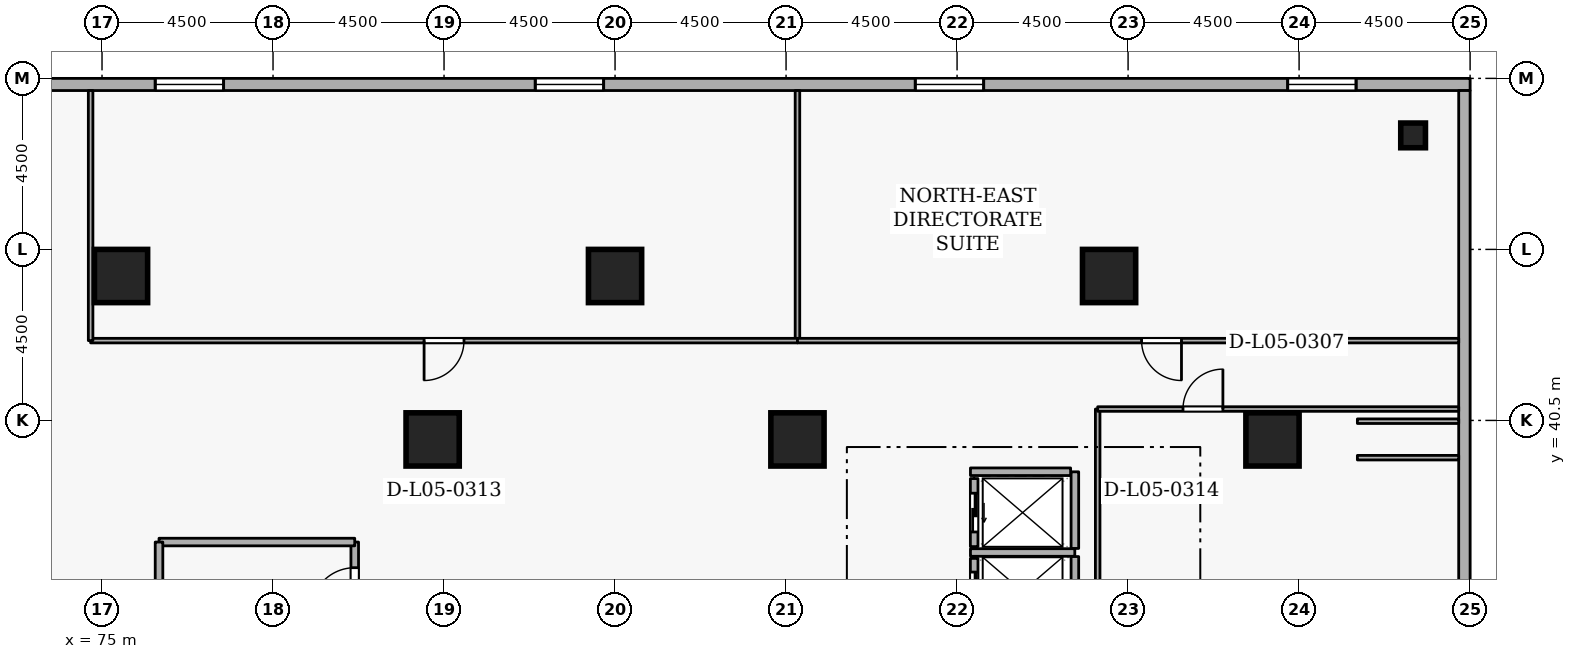
"""IFC4 building model, lengths in metres.
Left out: names, types, materials, properties, quantities, classifications, styles, units other than length and angle.
Written with IfcOpenShell. Run it as: python <this file> out.ifc"""

import sys

from ifc_helpers import new_model, si_unit, direction, frame, frame_2d, origin, origin_2d, place, context, subcontext, project, spatial, rectangle, extrude, element, fill, save


model = new_model("IFC4")
c1 = context("Model", 3, precision=1e-05, world=origin(), true_north=direction((0.0, 1.0)))
c2 = subcontext(c1, "Body", "Model", "MODEL_VIEW")
j1 = project(units=[si_unit("LENGTHUNIT", "METRE"), si_unit("PLANEANGLEUNIT", "RADIAN")], contexts=[c1])
p1 = place(None, origin())
s1 = spatial("IfcSite", under=j1, at=p1, CompositionType="ELEMENT")
p2 = place(p1, origin())
s2 = spatial("IfcBuilding", under=s1, at=p2, CompositionType="ELEMENT")
p3 = place(p2, frame((0.0, 0.0, 23.1)))
s3 = spatial("IfcBuildingStorey", under=s2, at=p3, CompositionType="ELEMENT", Elevation=23.1)
for number, where, z_axis, x_axis in (
    (1, (105.8, 40.0, 0.0), (0.0, 0.0, 1.0), (1.0, 0.0, 0.0)),
    (2, (101.5, 44.3, 0.0), (0.0, 0.0, 1.0), (1.0, 0.0, 0.0)),
    (3, (88.5, 44.3, 0.0), (0.0, 0.0, 1.0), (1.0, 0.0, 0.0)),
    (4, (75.5, 44.3, 0.0), (0.0, 0.0, 1.0), (1.0, 0.0, 0.0)),
    (5, (93.3, 40.0, 0.0), (0.0, 0.0, 1.0), (1.0, 0.0, 0.0)),
    (6, (83.7, 40.0, 0.0), (0.0, 0.0, 1.0), (1.0, 0.0, 0.0)),
):
    element("IfcColumn", number, at=place(p3, frame(where, z_axis=z_axis, x_axis=x_axis)), inside=s3, PredefinedType="COLUMN", context=c2, shape_type="SweptSolid", body=[
        extrude(rectangle(XDim=1.4, YDim=1.4, at=origin_2d()), origin(), (0.0, 0.0, 1.0), 4.8),
    ])
p4 = place(p3, frame((109.5, 48.0, 0.0), z_axis=(0.0, 0.0, 1.0), x_axis=(1.0, 0.0, 0.0)))
e7 = element("IfcColumn", 7, at=p4, inside=s3, PredefinedType="COLUMN", context=c2, shape_type="SweptSolid", body=[
    extrude(rectangle(XDim=0.65, YDim=0.65, at=origin_2d()), origin(), (0.0, 0.0, 1.0), 4.8),
])
p5 = place(p3, frame((111.0, 49.34, 0.0), z_axis=(0.0, 0.0, 1.0), x_axis=(-1.0, 0.0, 0.0)))
e8 = element("IfcWall", 8, at=p5, inside=s3, PredefinedType="STANDARD", context=c2, shape_type="SweptSolid", body=[
    extrude(rectangle(XDim=39.4, YDim=0.32, at=frame_2d((19.7, 0.0))), origin(), (0.0, 0.0, 1.0), 2.84),
])
p6 = place(p5, frame((3.0, 0.0, 0.65)))
e9 = element("IfcOpeningElement", 9, at=p6, cuts=e8, PredefinedType="OPENING", context=c2, shape_type="SweptSolid", body=[
    extrude(rectangle(XDim=1.8, YDim=1.25, at=frame_2d((0.9, 0.625))), frame((0.0, 0.17, 0.0), z_axis=(0.0, -1.0, 0.0), x_axis=(1.0, 0.0, 0.0)), (0.0, 0.0, 1.0), 0.34),
])
p7 = place(p5, frame((12.8, 0.0, 0.65)))
e10 = element("IfcOpeningElement", 10, at=p7, cuts=e8, PredefinedType="OPENING", context=c2, shape_type="SweptSolid", body=[
    extrude(rectangle(XDim=1.8, YDim=1.25, at=frame_2d((0.9, 0.625))), frame((0.0, 0.17, 0.0), z_axis=(0.0, -1.0, 0.0), x_axis=(1.0, 0.0, 0.0)), (0.0, 0.0, 1.0), 0.34),
])
p8 = place(p5, frame((22.8, 0.0, 0.65)))
e11 = element("IfcOpeningElement", 11, at=p8, cuts=e8, PredefinedType="OPENING", context=c2, shape_type="SweptSolid", body=[
    extrude(rectangle(XDim=1.8, YDim=1.25, at=frame_2d((0.9, 0.625))), frame((0.0, 0.17, 0.0), z_axis=(0.0, -1.0, 0.0), x_axis=(1.0, 0.0, 0.0)), (0.0, 0.0, 1.0), 0.34),
])
p9 = place(p5, frame((32.8, 0.0, 0.65)))
e12 = element("IfcOpeningElement", 12, at=p9, cuts=e8, PredefinedType="OPENING", context=c2, shape_type="SweptSolid", body=[
    extrude(rectangle(XDim=1.8, YDim=1.25, at=frame_2d((0.9, 0.625))), frame((0.0, 0.17, 0.0), z_axis=(0.0, -1.0, 0.0), x_axis=(1.0, 0.0, 0.0)), (0.0, 0.0, 1.0), 0.34),
])
p10 = place(p3, frame((110.85, 12.32, 0.0), z_axis=(0.0, 0.0, 1.0), x_axis=(0.0, 1.0, 0.0)))
e13 = element("IfcWall", 13, at=p10, inside=s3, PredefinedType="STANDARD", context=c2, shape_type="SweptSolid", body=[
    extrude(rectangle(XDim=36.86, YDim=0.3, at=frame_2d((18.43, 0.0))), origin(), (0.0, 0.0, 1.0), 2.84),
])
p11 = place(p3, frame((97.95, 36.87, 0.0), z_axis=(0.0, 0.0, 1.0), x_axis=(0.0, -1.0, 0.0)))
e14 = element("IfcWall", 14, at=p11, inside=s3, PredefinedType="STANDARD", context=c2, shape_type="SweptSolid", body=[
    extrude(rectangle(XDim=1.74, YDim=0.2, at=frame_2d((0.87, 0.0))), origin(), (0.0, 0.0, 1.0), 4.54),
])
p12 = place(p11, frame((0.36, 0.0, 0.0)))
e15 = element("IfcOpeningElement", 15, at=p12, cuts=e14, PredefinedType="OPENING", context=c2, shape_type="SweptSolid", body=[
    extrude(rectangle(XDim=1.02, YDim=2.06, at=frame_2d((0.51, 1.03))), frame((0.0, 0.11, 0.0), z_axis=(0.0, -1.0, 0.0), x_axis=(1.0, 0.0, 0.0)), (0.0, 0.0, 1.0), 0.22),
])
p13 = place(p3, frame((97.95, 38.97, 0.0), z_axis=(0.0, 0.0, 1.0), x_axis=(0.0, -1.0, 0.0)))
e16 = element("IfcWall", 16, at=p13, inside=s3, PredefinedType="STANDARD", context=c2, shape_type="SweptSolid", body=[
    extrude(rectangle(XDim=1.79, YDim=0.2, at=frame_2d((0.895, 0.0))), origin(), (0.0, 0.0, 1.0), 4.54),
])
p14 = place(p13, frame((0.385, 0.0, 0.0)))
e17 = element("IfcOpeningElement", 17, at=p14, cuts=e16, PredefinedType="OPENING", context=c2, shape_type="SweptSolid", body=[
    extrude(rectangle(XDim=1.02, YDim=2.06, at=frame_2d((0.51, 1.03))), frame((0.0, 0.11, 0.0), z_axis=(0.0, -1.0, 0.0), x_axis=(1.0, 0.0, 0.0)), (0.0, 0.0, 1.0), 0.22),
])
p15 = place(p3, frame((97.852, 37.025, 0.0), z_axis=(0.0, 0.0, 1.0), x_axis=(1.0, 0.0, 0.0)))
e18 = element("IfcWall", 18, at=p15, inside=s3, PredefinedType="STANDARD", context=c2, shape_type="SweptSolid", body=[
    extrude(rectangle(XDim=2.746, YDim=0.2, at=frame_2d((1.373, 0.0))), origin(), (0.0, 0.0, 1.0), 4.54),
])
p16 = place(p3, frame((100.6, 35.062, 0.0), z_axis=(0.0, 0.0, 1.0), x_axis=(0.0, 1.0, 0.0)))
e19 = element("IfcWall", 19, at=p16, inside=s3, PredefinedType="STANDARD", context=c2, shape_type="SweptSolid", body=[
    extrude(rectangle(XDim=1.856, YDim=0.2, at=frame_2d((0.928, 0.0))), origin(), (0.0, 0.0, 1.0), 4.54),
])
p17 = place(p3, frame((100.6, 37.132, 0.0), z_axis=(0.0, 0.0, 1.0), x_axis=(0.0, 1.0, 0.0)))
e20 = element("IfcWall", 20, at=p17, inside=s3, PredefinedType="STANDARD", context=c2, shape_type="SweptSolid", body=[
    extrude(rectangle(XDim=2.016, YDim=0.2, at=frame_2d((1.008, 0.0))), origin(), (0.0, 0.0, 1.0), 4.54),
])
p18 = place(p3, frame((97.852, 39.15, 0.0), z_axis=(0.0, 0.0, 1.0), x_axis=(1.0, 0.0, 0.0)))
e21 = element("IfcWall", 21, at=p18, inside=s3, PredefinedType="STANDARD", context=c2, shape_type="SweptSolid", body=[
    extrude(rectangle(XDim=2.636, YDim=0.2, at=frame_2d((1.318, 0.0))), origin(), (0.0, 0.0, 1.0), 4.54),
])
p19 = place(p3, frame((81.65, 34.8, 0.0), z_axis=(0.0, 0.0, 1.0), x_axis=(0.0, 1.0, 0.0)))
e22 = element("IfcWall", 22, at=p19, inside=s3, PredefinedType="STANDARD", context=c2, shape_type="SweptSolid", body=[
    extrude(rectangle(XDim=2.5, YDim=0.2, at=frame_2d((1.25, 0.0))), origin(), (0.0, 0.0, 1.0), 4.54),
])
p20 = place(p19, frame((0.675, 0.0, 0.0)))
e23 = element("IfcOpeningElement", 23, at=p20, cuts=e22, PredefinedType="OPENING", context=c2, shape_type="SweptSolid", body=[
    extrude(rectangle(XDim=1.15, YDim=2.1, at=frame_2d((0.575, 1.05))), frame((0.0, 0.11, 0.0), z_axis=(0.0, -1.0, 0.0), x_axis=(1.0, 0.0, 0.0)), (0.0, 0.0, 1.0), 0.22),
])
p21 = place(p3, frame((81.65, 37.3, 0.0), z_axis=(0.0, 0.0, 1.0), x_axis=(-1.0, 0.0, 0.0)))
e24 = element("IfcWall", 24, at=p21, inside=s3, PredefinedType="STANDARD", context=c2, shape_type="SweptSolid", body=[
    extrude(rectangle(XDim=5.15, YDim=0.2, at=frame_2d((2.575, 0.0))), origin(), (0.0, 0.0, 1.0), 4.54),
])
p22 = place(p3, frame((76.5, 37.3, 0.0), z_axis=(0.0, 0.0, 1.0), x_axis=(0.0, -1.0, 0.0)))
e25 = element("IfcWall", 25, at=p22, inside=s3, PredefinedType="STANDARD", context=c2, shape_type="SweptSolid", body=[
    extrude(rectangle(XDim=2.5, YDim=0.2, at=frame_2d((1.25, 0.0))), origin(), (0.0, 0.0, 1.0), 4.54),
])
p23 = place(p3, frame((101.2, 27.0, 0.0), z_axis=(0.0, 0.0, 1.0), x_axis=(0.0, 1.0, 0.0)))
e26 = element("IfcWall", 26, at=p23, inside=s3, PredefinedType="PARTITIONING", context=c2, shape_type="SweptSolid", body=[
    extrude(rectangle(XDim=13.8, YDim=0.12, at=frame_2d((6.9, 0.0))), origin(), (0.0, 0.0, 1.0), 4.54),
])
p24 = place(p3, frame((101.2, 40.8, 0.0), z_axis=(0.0, 0.0, 1.0), x_axis=(1.0, 0.0, 0.0)))
e27 = element("IfcWall", 27, at=p24, inside=s3, PredefinedType="PARTITIONING", context=c2, shape_type="SweptSolid", body=[
    extrude(rectangle(XDim=9.5, YDim=0.12, at=frame_2d((4.75, 0.0))), origin(), (0.0, 0.0, 1.0), 4.54),
])
p25 = place(p24, frame((2.245, 0.0, 0.0)))
e28 = element("IfcOpeningElement", 28, at=p25, cuts=e27, PredefinedType="OPENING", context=c2, shape_type="SweptSolid", body=[
    extrude(rectangle(XDim=1.05, YDim=2.1, at=frame_2d((0.525, 1.05))), frame((0.0, 0.07, 0.0), z_axis=(0.0, -1.0, 0.0), x_axis=(1.0, 0.0, 0.0)), (0.0, 0.0, 1.0), 0.14),
])
for number, where, z_axis, x_axis in (
    (29, (110.7, 40.48, 0.0), (0.0, 0.0, 1.0), (-1.0, 0.0, 0.0)),
    (30, (108.034, 39.52, 0.0), (0.0, 0.0, 1.0), (1.0, 0.0, 0.0)),
):
    element("IfcWall", number, at=place(p3, frame(where, z_axis=z_axis, x_axis=x_axis)), inside=s3, PredefinedType="PARTITIONING", context=c2, shape_type="SweptSolid", body=[
        extrude(rectangle(XDim=2.666, YDim=0.12, at=frame_2d((1.333, 0.0))), origin(), (0.0, 0.0, 1.0), 2.885),
    ])
p26 = place(p3, frame((93.3, 49.18, 0.0), z_axis=(0.0, 0.0, 1.0), x_axis=(0.0, -1.0, 0.0)))
e31 = element("IfcWall", 31, at=p26, inside=s3, PredefinedType="PARTITIONING", context=c2, shape_type="SweptSolid", body=[
    extrude(rectangle(XDim=6.58, YDim=0.12, at=frame_2d((3.29, 0.0))), origin(), (0.0, 0.0, 1.0), 4.54),
])
p27 = place(p3, frame((93.3, 42.6, 0.0), z_axis=(0.0, 0.0, 1.0), x_axis=(-1.0, 0.0, 0.0)))
e32 = element("IfcWall", 32, at=p27, inside=s3, PredefinedType="PARTITIONING", context=c2, shape_type="SweptSolid", body=[
    extrude(rectangle(XDim=18.6, YDim=0.12, at=frame_2d((9.3, 0.0))), origin(), (0.0, 0.0, 1.0), 4.54),
])
p28 = place(p27, frame((8.775, 0.0, 0.0)))
e33 = element("IfcOpeningElement", 33, at=p28, cuts=e32, PredefinedType="OPENING", context=c2, shape_type="SweptSolid", body=[
    extrude(rectangle(XDim=1.05, YDim=2.1, at=frame_2d((0.525, 1.05))), frame((0.0, 0.07, 0.0), z_axis=(0.0, -1.0, 0.0), x_axis=(1.0, 0.0, 0.0)), (0.0, 0.0, 1.0), 0.14),
])
p29 = place(p3, frame((74.7, 42.6, 0.0), z_axis=(0.0, 0.0, 1.0), x_axis=(0.0, 1.0, 0.0)))
e34 = element("IfcWall", 34, at=p29, inside=s3, PredefinedType="PARTITIONING", context=c2, shape_type="SweptSolid", body=[
    extrude(rectangle(XDim=6.58, YDim=0.12, at=frame_2d((3.29, 0.0))), origin(), (0.0, 0.0, 1.0), 4.54),
])
p30 = place(p3, frame((110.7, 42.6, 0.0), z_axis=(0.0, 0.0, 1.0), x_axis=(-1.0, 0.0, 0.0)))
e35 = element("IfcWall", 35, at=p30, inside=s3, PredefinedType="PARTITIONING", context=c2, shape_type="SweptSolid", body=[
    extrude(rectangle(XDim=17.4, YDim=0.12, at=frame_2d((8.7, 0.0))), origin(), (0.0, 0.0, 1.0), 4.54),
])
p31 = place(p30, frame((7.295, 0.0, 0.0)))
e36 = element("IfcOpeningElement", 36, at=p31, cuts=e35, PredefinedType="OPENING", context=c2, shape_type="SweptSolid", body=[
    extrude(rectangle(XDim=1.05, YDim=2.1, at=frame_2d((0.525, 1.05))), frame((0.0, 0.07, 0.0), z_axis=(0.0, -1.0, 0.0), x_axis=(1.0, 0.0, 0.0)), (0.0, 0.0, 1.0), 0.14),
])
p32 = place(p6, origin())
e37 = element("IfcWindow", 37, at=p32, inside=s3, PartitioningType="SINGLE_PANEL", PredefinedType="WINDOW", context=c2, shape_type="SweptSolid", body=[
    extrude(rectangle(XDim=1.8, YDim=1.25, at=frame_2d((0.9, 0.625))), frame((0.0, 0.03, 0.0), z_axis=(0.0, -1.0, 0.0), x_axis=(1.0, 0.0, 0.0)), (0.0, 0.0, 1.0), 0.06),
])
fill(e9, e37)
p33 = place(p7, origin())
e38 = element("IfcWindow", 38, at=p33, inside=s3, PartitioningType="SINGLE_PANEL", PredefinedType="WINDOW", context=c2, shape_type="SweptSolid", body=[
    extrude(rectangle(XDim=1.8, YDim=1.25, at=frame_2d((0.9, 0.625))), frame((0.0, 0.03, 0.0), z_axis=(0.0, -1.0, 0.0), x_axis=(1.0, 0.0, 0.0)), (0.0, 0.0, 1.0), 0.06),
])
fill(e10, e38)
p34 = place(p8, origin())
e39 = element("IfcWindow", 39, at=p34, inside=s3, PartitioningType="SINGLE_PANEL", PredefinedType="WINDOW", context=c2, shape_type="SweptSolid", body=[
    extrude(rectangle(XDim=1.8, YDim=1.25, at=frame_2d((0.9, 0.625))), frame((0.0, 0.03, 0.0), z_axis=(0.0, -1.0, 0.0), x_axis=(1.0, 0.0, 0.0)), (0.0, 0.0, 1.0), 0.06),
])
fill(e11, e39)
p35 = place(p9, origin())
e40 = element("IfcWindow", 40, at=p35, inside=s3, PartitioningType="SINGLE_PANEL", PredefinedType="WINDOW", context=c2, shape_type="SweptSolid", body=[
    extrude(rectangle(XDim=1.8, YDim=1.25, at=frame_2d((0.9, 0.625))), frame((0.0, 0.03, 0.0), z_axis=(0.0, -1.0, 0.0), x_axis=(1.0, 0.0, 0.0)), (0.0, 0.0, 1.0), 0.06),
])
fill(e12, e40)
p36 = place(p12, origin())
e41 = element("IfcDoor", 41, at=p36, inside=s3, OperationType="SLIDING_TO_LEFT", PredefinedType="DOOR", context=c2, shape_type="SweptSolid", body=[
    extrude(rectangle(XDim=1.02, YDim=2.06, at=frame_2d((0.51, 1.03))), frame((0.0, 0.025, 0.0), z_axis=(0.0, -1.0, 0.0), x_axis=(1.0, 0.0, 0.0)), (0.0, 0.0, 1.0), 0.05),
])
fill(e15, e41)
p37 = place(p14, origin())
e42 = element("IfcDoor", 42, at=p37, inside=s3, OperationType="SLIDING_TO_LEFT", PredefinedType="DOOR", context=c2, shape_type="SweptSolid", body=[
    extrude(rectangle(XDim=1.02, YDim=2.06, at=frame_2d((0.51, 1.03))), frame((0.0, 0.025, 0.0), z_axis=(0.0, -1.0, 0.0), x_axis=(1.0, 0.0, 0.0)), (0.0, 0.0, 1.0), 0.05),
])
fill(e17, e42)
p38 = place(p20, origin())
e43 = element("IfcDoor", 43, at=p38, inside=s3, OperationType="SINGLE_SWING_LEFT", PredefinedType="DOOR", context=c2, shape_type="SweptSolid", body=[
    extrude(rectangle(XDim=1.15, YDim=2.1, at=frame_2d((0.575, 1.05))), frame((0.0, 0.025, 0.0), z_axis=(0.0, -1.0, 0.0), x_axis=(1.0, 0.0, 0.0)), (0.0, 0.0, 1.0), 0.05),
])
fill(e23, e43)
p39 = place(p25, origin())
e44 = element("IfcDoor", 44, at=p39, inside=s3, OperationType="SINGLE_SWING_RIGHT", PredefinedType="DOOR", context=c2, shape_type="SweptSolid", body=[
    extrude(rectangle(XDim=1.05, YDim=2.1, at=frame_2d((0.525, 1.05))), frame((0.0, 0.025, 0.0), z_axis=(0.0, -1.0, 0.0), x_axis=(1.0, 0.0, 0.0)), (0.0, 0.0, 1.0), 0.05),
])
fill(e28, e44)
p40 = place(p28, origin())
e45 = element("IfcDoor", 45, at=p40, inside=s3, OperationType="SINGLE_SWING_RIGHT", PredefinedType="DOOR", context=c2, shape_type="SweptSolid", body=[
    extrude(rectangle(XDim=1.05, YDim=2.1, at=frame_2d((0.525, 1.05))), frame((0.0, 0.025, 0.0), z_axis=(0.0, -1.0, 0.0), x_axis=(1.0, 0.0, 0.0)), (0.0, 0.0, 1.0), 0.05),
])
fill(e33, e45)
p41 = place(p31, origin())
e46 = element("IfcDoor", 46, at=p41, inside=s3, OperationType="SINGLE_SWING_LEFT", PredefinedType="DOOR", context=c2, shape_type="SweptSolid", body=[
    extrude(rectangle(XDim=1.05, YDim=2.1, at=frame_2d((0.525, 1.05))), frame((0.0, 0.025, 0.0), z_axis=(0.0, -1.0, 0.0), x_axis=(1.0, 0.0, 0.0)), (0.0, 0.0, 1.0), 0.05),
])
fill(e36, e46)
save(model, sys.argv[1])
